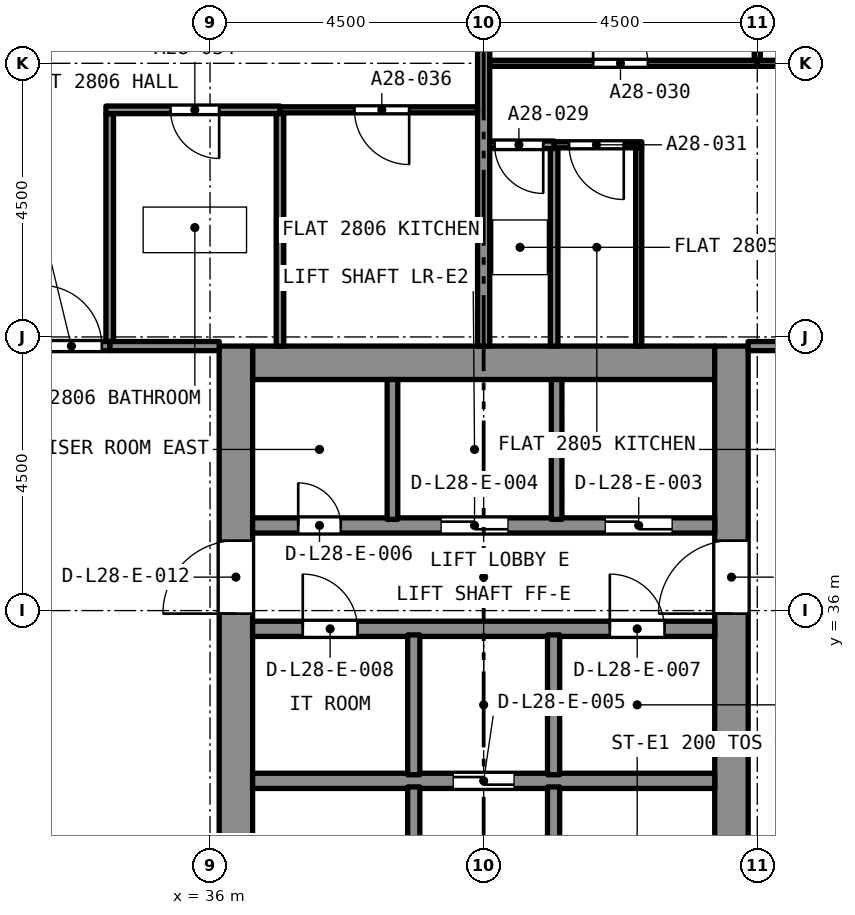
"""IFC4 building model, lengths in metres.
Left out: names, types, materials, properties, quantities, classifications, styles, units other than length and angle.
Written with IfcOpenShell. Run it as: python <this file> out.ifc"""

import sys

from ifc_helpers import new_model, si_unit, direction, frame, frame_2d, origin, place, context, subcontext, project, spatial, rectangle, extrude, element, fill, save


model = new_model("IFC4")
c1 = context("Model", 3, precision=1e-05, world=origin(), true_north=direction((0.0, 1.0)))
c2 = subcontext(c1, "Body", "Model", "MODEL_VIEW")
j1 = project(units=[si_unit("LENGTHUNIT", "METRE"), si_unit("PLANEANGLEUNIT", "RADIAN")], contexts=[c1])
p1 = place(None, origin())
s1 = spatial("IfcSite", under=j1, at=p1, CompositionType="ELEMENT")
p2 = place(p1, origin())
s2 = spatial("IfcBuilding", under=s1, at=p2, CompositionType="ELEMENT")
p3 = place(p2, frame((0.0, 0.0, 102.4)))
s3 = spatial("IfcBuildingStorey", under=s2, at=p3, CompositionType="ELEMENT", Elevation=102.4)
p4 = place(p3, frame((36.7, 40.075, 0.0), z_axis=(0.0, 0.0, 1.0), x_axis=(1.0, 0.0, 0.0)))
e1 = element("IfcWall", 1, at=p4, inside=s3, PredefinedType="SOLIDWALL", context=c2, shape_type="SweptSolid", body=[
    extrude(rectangle(XDim=7.6, YDim=0.55, at=frame_2d((3.8, 0.0))), origin(), (0.0, 0.0, 1.0), 3.2),
])
p5 = place(p3, frame((36.425, 27.15, 0.0), z_axis=(0.0, 0.0, 1.0), x_axis=(0.0, 1.0, 0.0)))
e2 = element("IfcWall", 2, at=p5, inside=s3, PredefinedType="SOLIDWALL", context=c2, shape_type="SweptSolid", body=[
    extrude(rectangle(XDim=13.2, YDim=0.55, at=frame_2d((6.6, 0.0))), origin(), (0.0, 0.0, 1.0), 3.2),
])
p6 = place(p5, frame((8.8, 0.0, 0.0)))
e3 = element("IfcOpeningElement", 3, at=p6, cuts=e2, PredefinedType="OPENING", context=c2, shape_type="SweptSolid", body=[
    extrude(rectangle(XDim=1.2, YDim=2.1, at=frame_2d((0.6, 1.05))), frame((0.0, 0.285, 0.0), z_axis=(0.0, -1.0, 0.0), x_axis=(1.0, 0.0, 0.0)), (0.0, 0.0, 1.0), 0.57),
])
p7 = place(p3, frame((44.575, 27.15, 0.0), z_axis=(0.0, 0.0, 1.0), x_axis=(0.0, 1.0, 0.0)))
e4 = element("IfcWall", 4, at=p7, inside=s3, PredefinedType="SOLIDWALL", context=c2, shape_type="SweptSolid", body=[
    extrude(rectangle(XDim=13.2, YDim=0.55, at=frame_2d((6.6, 0.0))), origin(), (0.0, 0.0, 1.0), 3.2),
])
p8 = place(p7, frame((8.8, 0.0, 0.0)))
e5 = element("IfcOpeningElement", 5, at=p8, cuts=e4, PredefinedType="OPENING", context=c2, shape_type="SweptSolid", body=[
    extrude(rectangle(XDim=1.2, YDim=2.1, at=frame_2d((0.6, 1.05))), frame((0.0, 0.285, 0.0), z_axis=(0.0, -1.0, 0.0), x_axis=(1.0, 0.0, 0.0)), (0.0, 0.0, 1.0), 0.57),
])
p9 = place(p3, frame((41.659, 43.66, 0.0), z_axis=(0.0, 0.0, 1.0), x_axis=(-1.0, 0.0, 0.0)))
e6 = element("IfcWall", 6, at=p9, inside=s3, PredefinedType="PARTITIONING", context=c2, shape_type="SweptSolid", body=[
    extrude(rectangle(XDim=1.059, YDim=0.125, at=frame_2d((0.53, 0.0))), origin(), (0.0, 0.0, 1.0), 2.9),
])
p10 = place(p9, frame((0.179, 0.0, 0.0)))
e7 = element("IfcOpeningElement", 7, at=p10, cuts=e6, PredefinedType="OPENING", context=c2, shape_type="SweptSolid", body=[
    extrude(rectangle(XDim=0.8, YDim=2.1, at=frame_2d((0.4, 1.05))), frame((0.0, 0.073, 0.0), z_axis=(0.0, -1.0, 0.0), x_axis=(1.0, 0.0, 0.0)), (0.0, 0.0, 1.0), 0.145),
])
p11 = place(p3, frame((41.659, 40.35, 0.0), z_axis=(0.0, 0.0, 1.0), x_axis=(0.0, 1.0, 0.0)))
e8 = element("IfcWall", 8, at=p11, inside=s3, PredefinedType="PARTITIONING", context=c2, shape_type="SweptSolid", body=[
    extrude(rectangle(XDim=3.247, YDim=0.125, at=frame_2d((1.624, 0.0))), origin(), (0.0, 0.0, 1.0), 2.9),
])
p12 = place(p3, frame((40.5, 40.35, 0.0), z_axis=(0.0, 0.0, 1.0), x_axis=(0.0, 1.0, 0.0)))
e9 = element("IfcWall", 9, at=p12, inside=s3, PredefinedType="PARTITIONING", context=c2, shape_type="SweptSolid", body=[
    extrude(rectangle(XDim=8.575, YDim=0.2, at=frame_2d((4.288, 0.0))), origin(), (0.0, 0.0, 1.0), 2.9),
])
p13 = place(p3, frame((40.6, 45.0, 0.0), z_axis=(0.0, 0.0, 1.0), x_axis=(1.0, 0.0, 0.0)))
e10 = element("IfcWall", 10, at=p13, inside=s3, PredefinedType="PARTITIONING", context=c2, shape_type="SweptSolid", body=[
    extrude(rectangle(XDim=4.4, YDim=0.1, at=frame_2d((2.2, 0.0))), origin(), (0.0, 0.0, 1.0), 2.9),
])
p14 = place(p13, frame((1.7, 0.0, 0.0)))
e11 = element("IfcOpeningElement", 11, at=p14, cuts=e10, PredefinedType="OPENING", context=c2, shape_type="SweptSolid", body=[
    extrude(rectangle(XDim=0.9, YDim=2.1, at=frame_2d((0.45, 1.05))), frame((0.0, 0.06, 0.0), z_axis=(0.0, -1.0, 0.0), x_axis=(1.0, 0.0, 0.0)), (0.0, 0.0, 1.0), 0.12),
])
p15 = place(p3, frame((45.0, 45.05, 0.0), z_axis=(0.0, 0.0, 1.0), x_axis=(0.0, 1.0, 0.0)))
e12 = element("IfcWall", 12, at=p15, inside=s3, PredefinedType="PARTITIONING", context=c2, shape_type="SweptSolid", body=[
    extrude(rectangle(XDim=3.828, YDim=0.1, at=frame_2d((1.914, 0.0))), origin(), (0.0, 0.0, 1.0), 2.9),
])
p16 = place(p3, frame((43.05, 40.35, 0.0), z_axis=(0.0, 0.0, 1.0), x_axis=(0.0, 1.0, 0.0)))
e13 = element("IfcWall", 13, at=p16, inside=s3, PredefinedType="PARTITIONING", context=c2, shape_type="SweptSolid", body=[
    extrude(rectangle(XDim=3.26, YDim=0.1, at=frame_2d((1.63, 0.0))), origin(), (0.0, 0.0, 1.0), 2.9),
])
p17 = place(p3, frame((43.1, 43.66, 0.0), z_axis=(0.0, 0.0, 1.0), x_axis=(-1.0, 0.0, 0.0)))
e14 = element("IfcWall", 14, at=p17, inside=s3, PredefinedType="PARTITIONING", context=c2, shape_type="SweptSolid", body=[
    extrude(rectangle(XDim=1.441, YDim=0.1, at=frame_2d((0.72, 0.0))), origin(), (0.0, 0.0, 1.0), 2.9),
])
p18 = place(p17, frame((0.295, 0.0, 0.0)))
e15 = element("IfcOpeningElement", 15, at=p18, cuts=e14, PredefinedType="OPENING", context=c2, shape_type="SweptSolid", body=[
    extrude(rectangle(XDim=0.9, YDim=2.1, at=frame_2d((0.45, 1.05))), frame((0.0, 0.06, 0.0), z_axis=(0.0, -1.0, 0.0), x_axis=(1.0, 0.0, 0.0)), (0.0, 0.0, 1.0), 0.12),
])
p19 = place(p3, frame((45.0, 45.0, 0.0), z_axis=(0.0, 0.0, 1.0), x_axis=(1.0, 0.0, 0.0)))
e16 = element("IfcWall", 16, at=p19, inside=s3, PredefinedType="PARTITIONING", context=c2, shape_type="SweptSolid", body=[
    extrude(rectangle(XDim=3.878, YDim=0.1, at=frame_2d((1.939, 0.0))), origin(), (0.0, 0.0, 1.0), 2.9),
])
p20 = place(p19, frame((1.462, 0.0, 0.0)))
e17 = element("IfcOpeningElement", 17, at=p20, cuts=e16, PredefinedType="OPENING", context=c2, shape_type="SweptSolid", body=[
    extrude(rectangle(XDim=1.0, YDim=2.1, at=frame_2d((0.5, 1.05))), frame((0.0, 0.06, 0.0), z_axis=(0.0, -1.0, 0.0), x_axis=(1.0, 0.0, 0.0)), (0.0, 0.0, 1.0), 0.12),
])
p21 = place(p3, frame((44.85, 40.35, 0.0), z_axis=(0.0, 0.0, 1.0), x_axis=(1.0, 0.0, 0.0)))
e18 = element("IfcWall", 18, at=p21, inside=s3, PredefinedType="PARTITIONING", context=c2, shape_type="SweptSolid", body=[
    extrude(rectangle(XDim=4.075, YDim=0.15, at=frame_2d((2.038, 0.0))), origin(), (0.0, 0.0, 1.0), 2.9),
])
p22 = place(p21, frame((1.9, 0.0, 0.0)))
e19 = element("IfcOpeningElement", 19, at=p22, cuts=e18, PredefinedType="OPENING", context=c2, shape_type="SweptSolid", body=[
    extrude(rectangle(XDim=1.0, YDim=2.1, at=frame_2d((0.5, 1.05))), frame((0.0, 0.085, 0.0), z_axis=(0.0, -1.0, 0.0), x_axis=(1.0, 0.0, 0.0)), (0.0, 0.0, 1.0), 0.17),
])
p23 = place(p3, frame((34.35, 40.425, 0.0), z_axis=(0.0, 0.0, 1.0), x_axis=(0.0, 1.0, 0.0)))
e20 = element("IfcWall", 20, at=p23, inside=s3, PredefinedType="PARTITIONING", context=c2, shape_type="SweptSolid", body=[
    extrude(rectangle(XDim=3.748, YDim=0.125, at=frame_2d((1.874, 0.0))), origin(), (0.0, 0.0, 1.0), 2.9),
])
p24 = place(p3, frame((37.15, 44.235, 0.0), z_axis=(0.0, 0.0, 1.0), x_axis=(-1.0, 0.0, 0.0)))
e21 = element("IfcWall", 21, at=p24, inside=s3, PredefinedType="PARTITIONING", context=c2, shape_type="SweptSolid", body=[
    extrude(rectangle(XDim=2.862, YDim=0.125, at=frame_2d((1.431, 0.0))), origin(), (0.0, 0.0, 1.0), 2.9),
])
p25 = place(p24, frame((1.0, 0.0, 0.0)))
e22 = element("IfcOpeningElement", 22, at=p25, cuts=e21, PredefinedType="OPENING", context=c2, shape_type="SweptSolid", body=[
    extrude(rectangle(XDim=0.8, YDim=2.1, at=frame_2d((0.4, 1.05))), frame((0.0, 0.073, 0.0), z_axis=(0.0, -1.0, 0.0), x_axis=(1.0, 0.0, 0.0)), (0.0, 0.0, 1.0), 0.145),
])
p26 = place(p3, frame((37.15, 40.35, 0.0), z_axis=(0.0, 0.0, 1.0), x_axis=(0.0, 1.0, 0.0)))
e23 = element("IfcWall", 23, at=p26, inside=s3, PredefinedType="PARTITIONING", context=c2, shape_type="SweptSolid", body=[
    extrude(rectangle(XDim=3.823, YDim=0.125, at=frame_2d((1.911, 0.0))), origin(), (0.0, 0.0, 1.0), 2.9),
])
p27 = place(p3, frame((34.35, 40.35, 0.0), z_axis=(0.0, 0.0, 1.0), x_axis=(1.0, 0.0, 0.0)))
e24 = element("IfcWall", 24, at=p27, inside=s3, PredefinedType="PARTITIONING", context=c2, shape_type="SweptSolid", body=[
    extrude(rectangle(XDim=1.8, YDim=0.15, at=frame_2d((0.9, 0.0))), origin(), (0.0, 0.0, 1.0), 2.9),
])
p28 = place(p3, frame((40.4, 44.235, 0.0), z_axis=(0.0, 0.0, 1.0), x_axis=(-1.0, 0.0, 0.0)))
e25 = element("IfcWall", 25, at=p28, inside=s3, PredefinedType="PARTITIONING", context=c2, shape_type="SweptSolid", body=[
    extrude(rectangle(XDim=3.25, YDim=0.1, at=frame_2d((1.625, 0.0))), origin(), (0.0, 0.0, 1.0), 2.9),
])
p29 = place(p28, frame((1.125, 0.0, 0.0)))
e26 = element("IfcOpeningElement", 26, at=p29, cuts=e25, PredefinedType="OPENING", context=c2, shape_type="SweptSolid", body=[
    extrude(rectangle(XDim=0.9, YDim=2.1, at=frame_2d((0.45, 1.05))), frame((0.0, 0.06, 0.0), z_axis=(0.0, -1.0, 0.0), x_axis=(1.0, 0.0, 0.0)), (0.0, 0.0, 1.0), 0.12),
])
p30 = place(p3, frame((32.075, 40.35, 0.0), z_axis=(0.0, 0.0, 1.0), x_axis=(1.0, 0.0, 0.0)))
e27 = element("IfcWall", 27, at=p30, inside=s3, PredefinedType="PARTITIONING", context=c2, shape_type="SweptSolid", body=[
    extrude(rectangle(XDim=2.275, YDim=0.15, at=frame_2d((1.138, 0.0))), origin(), (0.0, 0.0, 1.0), 2.9),
])
p31 = place(p30, frame((1.145, 0.0, 0.0)))
e28 = element("IfcOpeningElement", 28, at=p31, cuts=e27, PredefinedType="OPENING", context=c2, shape_type="SweptSolid", body=[
    extrude(rectangle(XDim=1.0, YDim=2.1, at=frame_2d((0.5, 1.05))), frame((0.0, 0.085, 0.0), z_axis=(0.0, -1.0, 0.0), x_axis=(1.0, 0.0, 0.0)), (0.0, 0.0, 1.0), 0.17),
])
p32 = place(p3, frame((36.7, 33.2, 0.0), z_axis=(0.0, 0.0, 1.0), x_axis=(1.0, 0.0, 0.0)))
e29 = element("IfcWall", 29, at=p32, inside=s3, PredefinedType="SOLIDWALL", context=c2, shape_type="SweptSolid", body=[
    extrude(rectangle(XDim=7.6, YDim=0.25, at=frame_2d((3.8, 0.0))), origin(), (0.0, 0.0, 1.0), 2.9),
])
p33 = place(p32, frame((3.3, 0.0, 0.0)))
e30 = element("IfcOpeningElement", 30, at=p33, cuts=e29, PredefinedType="OPENING", context=c2, shape_type="SweptSolid", body=[
    extrude(rectangle(XDim=1.0, YDim=2.1, at=frame_2d((0.5, 1.05))), frame((0.0, 0.135, 0.0), z_axis=(0.0, -1.0, 0.0), x_axis=(1.0, 0.0, 0.0)), (0.0, 0.0, 1.0), 0.27),
])
p34 = place(p3, frame((36.7, 35.7, 0.0), z_axis=(0.0, 0.0, 1.0), x_axis=(1.0, 0.0, 0.0)))
e31 = element("IfcWall", 31, at=p34, inside=s3, PredefinedType="SOLIDWALL", context=c2, shape_type="SweptSolid", body=[
    extrude(rectangle(XDim=7.6, YDim=0.25, at=frame_2d((3.8, 0.0))), origin(), (0.0, 0.0, 1.0), 2.9),
])
p35 = place(p34, frame((5.875, 0.0, 0.0)))
e32 = element("IfcOpeningElement", 32, at=p35, cuts=e31, PredefinedType="OPENING", context=c2, shape_type="SweptSolid", body=[
    extrude(rectangle(XDim=0.9, YDim=2.1, at=frame_2d((0.45, 1.05))), frame((0.0, 0.135, 0.0), z_axis=(0.0, -1.0, 0.0), x_axis=(1.0, 0.0, 0.0)), (0.0, 0.0, 1.0), 0.27),
])
p36 = place(p34, frame((0.825, 0.0, 0.0)))
e33 = element("IfcOpeningElement", 33, at=p36, cuts=e31, PredefinedType="OPENING", context=c2, shape_type="SweptSolid", body=[
    extrude(rectangle(XDim=0.9, YDim=2.1, at=frame_2d((0.45, 1.05))), frame((0.0, 0.135, 0.0), z_axis=(0.0, -1.0, 0.0), x_axis=(1.0, 0.0, 0.0)), (0.0, 0.0, 1.0), 0.27),
])
p37 = place(p3, frame((36.7, 37.4, 0.0), z_axis=(0.0, 0.0, 1.0), x_axis=(1.0, 0.0, 0.0)))
e34 = element("IfcWall", 34, at=p37, inside=s3, PredefinedType="SOLIDWALL", context=c2, shape_type="SweptSolid", body=[
    extrude(rectangle(XDim=7.6, YDim=0.25, at=frame_2d((3.8, 0.0))), origin(), (0.0, 0.0, 1.0), 2.9),
])
p38 = place(p37, frame((5.8, 0.0, 0.0)))
e35 = element("IfcOpeningElement", 35, at=p38, cuts=e34, PredefinedType="OPENING", context=c2, shape_type="SweptSolid", body=[
    extrude(rectangle(XDim=1.1, YDim=2.4, at=frame_2d((0.55, 1.2))), frame((0.0, 0.135, 0.0), z_axis=(0.0, -1.0, 0.0), x_axis=(1.0, 0.0, 0.0)), (0.0, 0.0, 1.0), 0.27),
])
p39 = place(p37, frame((3.1, 0.0, 0.0)))
e36 = element("IfcOpeningElement", 36, at=p39, cuts=e34, PredefinedType="OPENING", context=c2, shape_type="SweptSolid", body=[
    extrude(rectangle(XDim=1.1, YDim=2.4, at=frame_2d((0.55, 1.2))), frame((0.0, 0.135, 0.0), z_axis=(0.0, -1.0, 0.0), x_axis=(1.0, 0.0, 0.0)), (0.0, 0.0, 1.0), 0.27),
])
p40 = place(p37, frame((0.75, 0.0, 0.0)))
e37 = element("IfcOpeningElement", 37, at=p40, cuts=e34, PredefinedType="OPENING", context=c2, shape_type="SweptSolid", body=[
    extrude(rectangle(XDim=0.7, YDim=2.1, at=frame_2d((0.35, 1.05))), frame((0.0, 0.135, 0.0), z_axis=(0.0, -1.0, 0.0), x_axis=(1.0, 0.0, 0.0)), (0.0, 0.0, 1.0), 0.27),
])
p41 = place(p3, frame((41.65, 27.7, 0.0), z_axis=(0.0, 0.0, 1.0), x_axis=(0.0, 1.0, 0.0)))
e38 = element("IfcWall", 38, at=p41, inside=s3, PredefinedType="SOLIDWALL", context=c2, shape_type="SweptSolid", body=[
    extrude(rectangle(XDim=5.4, YDim=0.2, at=frame_2d((2.7, 0.0))), origin(), (0.0, 0.0, 1.0), 2.9),
])
p42 = place(p41, frame((0.2, 0.0, 0.0)))
e39 = element("IfcOpeningElement", 39, at=p42, cuts=e38, PredefinedType="OPENING", context=c2, shape_type="SweptSolid", body=[
    extrude(rectangle(XDim=0.9, YDim=2.1, at=frame_2d((0.45, 1.05))), frame((0.0, 0.11, 0.0), z_axis=(0.0, -1.0, 0.0), x_axis=(1.0, 0.0, 0.0)), (0.0, 0.0, 1.0), 0.22),
])
p43 = place(p3, frame((39.35, 27.7, 0.0), z_axis=(0.0, 0.0, 1.0), x_axis=(0.0, 1.0, 0.0)))
e40 = element("IfcWall", 40, at=p43, inside=s3, PredefinedType="SOLIDWALL", context=c2, shape_type="SweptSolid", body=[
    extrude(rectangle(XDim=5.4, YDim=0.2, at=frame_2d((2.7, 0.0))), origin(), (0.0, 0.0, 1.0), 2.9),
])
p44 = place(p43, frame((0.2, 0.0, 0.0)))
e41 = element("IfcOpeningElement", 41, at=p44, cuts=e40, PredefinedType="OPENING", context=c2, shape_type="SweptSolid", body=[
    extrude(rectangle(XDim=0.9, YDim=2.1, at=frame_2d((0.45, 1.05))), frame((0.0, 0.11, 0.0), z_axis=(0.0, -1.0, 0.0), x_axis=(1.0, 0.0, 0.0)), (0.0, 0.0, 1.0), 0.22),
])
for number, where, z_axis, x_axis in (
    (42, (41.65, 33.3, 0.0), (0.0, 0.0, 1.0), (0.0, 1.0, 0.0)),
    (43, (39.35, 33.3, 0.0), (0.0, 0.0, 1.0), (0.0, 1.0, 0.0)),
):
    element("IfcWall", number, at=place(p3, frame(where, z_axis=z_axis, x_axis=x_axis)), inside=s3, PredefinedType="SOLIDWALL", context=c2, shape_type="SweptSolid", body=[
        extrude(rectangle(XDim=2.3, YDim=0.2, at=frame_2d((1.15, 0.0))), origin(), (0.0, 0.0, 1.0), 2.9),
    ])
for number, where, z_axis, x_axis in (
    (44, (41.7, 37.5, 0.0), (0.0, 0.0, 1.0), (0.0, 1.0, 0.0)),
    (45, (39.0, 37.5, 0.0), (0.0, 0.0, 1.0), (0.0, 1.0, 0.0)),
):
    element("IfcWall", number, at=place(p3, frame(where, z_axis=z_axis, x_axis=x_axis)), inside=s3, PredefinedType="SOLIDWALL", context=c2, shape_type="SweptSolid", body=[
        extrude(rectangle(XDim=2.3, YDim=0.175, at=frame_2d((1.15, 0.0))), origin(), (0.0, 0.0, 1.0), 2.9),
    ])
p45 = place(p10, origin())
e46 = element("IfcDoor", 46, at=p45, inside=s3, OperationType="SINGLE_SWING_RIGHT", PredefinedType="DOOR", context=c2, shape_type="SweptSolid", body=[
    extrude(rectangle(XDim=0.8, YDim=2.1, at=frame_2d((0.4, 1.05))), frame((0.0, 0.025, 0.0), z_axis=(0.0, -1.0, 0.0), x_axis=(1.0, 0.0, 0.0)), (0.0, 0.0, 1.0), 0.05),
])
fill(e7, e46)
p46 = place(p14, origin())
e47 = element("IfcDoor", 47, at=p46, inside=s3, OperationType="SINGLE_SWING_LEFT", PredefinedType="DOOR", context=c2, shape_type="SweptSolid", body=[
    extrude(rectangle(XDim=0.9, YDim=2.1, at=frame_2d((0.45, 1.05))), frame((0.0, 0.025, 0.0), z_axis=(0.0, -1.0, 0.0), x_axis=(1.0, 0.0, 0.0)), (0.0, 0.0, 1.0), 0.05),
])
fill(e11, e47)
p47 = place(p18, origin())
e48 = element("IfcDoor", 48, at=p47, inside=s3, OperationType="SINGLE_SWING_RIGHT", PredefinedType="DOOR", context=c2, shape_type="SweptSolid", body=[
    extrude(rectangle(XDim=0.9, YDim=2.1, at=frame_2d((0.45, 1.05))), frame((0.0, 0.025, 0.0), z_axis=(0.0, -1.0, 0.0), x_axis=(1.0, 0.0, 0.0)), (0.0, 0.0, 1.0), 0.05),
])
fill(e15, e48)
p48 = place(p25, origin())
e49 = element("IfcDoor", 49, at=p48, inside=s3, OperationType="SINGLE_SWING_LEFT", PredefinedType="DOOR", context=c2, shape_type="SweptSolid", body=[
    extrude(rectangle(XDim=0.8, YDim=2.1, at=frame_2d((0.4, 1.05))), frame((0.0, 0.025, 0.0), z_axis=(0.0, -1.0, 0.0), x_axis=(1.0, 0.0, 0.0)), (0.0, 0.0, 1.0), 0.05),
])
fill(e22, e49)
p49 = place(p29, origin())
e50 = element("IfcDoor", 50, at=p49, inside=s3, OperationType="SINGLE_SWING_LEFT", PredefinedType="DOOR", context=c2, shape_type="SweptSolid", body=[
    extrude(rectangle(XDim=0.9, YDim=2.1, at=frame_2d((0.45, 1.05))), frame((0.0, 0.025, 0.0), z_axis=(0.0, -1.0, 0.0), x_axis=(1.0, 0.0, 0.0)), (0.0, 0.0, 1.0), 0.05),
])
fill(e26, e50)
p50 = place(p31, origin())
e51 = element("IfcDoor", 51, at=p50, inside=s3, OperationType="SINGLE_SWING_RIGHT", PredefinedType="DOOR", context=c2, shape_type="SweptSolid", body=[
    extrude(rectangle(XDim=1.0, YDim=2.1, at=frame_2d((0.5, 1.05))), frame((0.0, 0.025, 0.0), z_axis=(0.0, -1.0, 0.0), x_axis=(1.0, 0.0, 0.0)), (0.0, 0.0, 1.0), 0.05),
])
fill(e28, e51)
p51 = place(p38, origin())
e52 = element("IfcDoor", 52, at=p51, inside=s3, OperationType="SLIDING_TO_LEFT", PredefinedType="DOOR", context=c2, shape_type="SweptSolid", body=[
    extrude(rectangle(XDim=1.1, YDim=2.4, at=frame_2d((0.55, 1.2))), frame((0.0, 0.025, 0.0), z_axis=(0.0, -1.0, 0.0), x_axis=(1.0, 0.0, 0.0)), (0.0, 0.0, 1.0), 0.05),
])
fill(e35, e52)
p52 = place(p39, origin())
e53 = element("IfcDoor", 53, at=p52, inside=s3, OperationType="SLIDING_TO_LEFT", PredefinedType="DOOR", context=c2, shape_type="SweptSolid", body=[
    extrude(rectangle(XDim=1.1, YDim=2.4, at=frame_2d((0.55, 1.2))), frame((0.0, 0.025, 0.0), z_axis=(0.0, -1.0, 0.0), x_axis=(1.0, 0.0, 0.0)), (0.0, 0.0, 1.0), 0.05),
])
fill(e36, e53)
p53 = place(p33, origin())
e54 = element("IfcDoor", 54, at=p53, inside=s3, OperationType="SLIDING_TO_LEFT", PredefinedType="DOOR", context=c2, shape_type="SweptSolid", body=[
    extrude(rectangle(XDim=1.0, YDim=2.1, at=frame_2d((0.5, 1.05))), frame((0.0, 0.025, 0.0), z_axis=(0.0, -1.0, 0.0), x_axis=(1.0, 0.0, 0.0)), (0.0, 0.0, 1.0), 0.05),
])
fill(e30, e54)
p54 = place(p40, origin())
e55 = element("IfcDoor", 55, at=p54, inside=s3, OperationType="SINGLE_SWING_LEFT", PredefinedType="DOOR", context=c2, shape_type="SweptSolid", body=[
    extrude(rectangle(XDim=0.7, YDim=2.1, at=frame_2d((0.35, 1.05))), frame((0.0, 0.025, 0.0), z_axis=(0.0, -1.0, 0.0), x_axis=(1.0, 0.0, 0.0)), (0.0, 0.0, 1.0), 0.05),
])
fill(e37, e55)
p55 = place(p35, origin())
e56 = element("IfcDoor", 56, at=p55, inside=s3, OperationType="SINGLE_SWING_LEFT", PredefinedType="DOOR", context=c2, shape_type="SweptSolid", body=[
    extrude(rectangle(XDim=0.9, YDim=2.1, at=frame_2d((0.45, 1.05))), frame((0.0, 0.025, 0.0), z_axis=(0.0, -1.0, 0.0), x_axis=(1.0, 0.0, 0.0)), (0.0, 0.0, 1.0), 0.05),
])
fill(e32, e56)
p56 = place(p36, origin())
e57 = element("IfcDoor", 57, at=p56, inside=s3, OperationType="SINGLE_SWING_LEFT", PredefinedType="DOOR", context=c2, shape_type="SweptSolid", body=[
    extrude(rectangle(XDim=0.9, YDim=2.1, at=frame_2d((0.45, 1.05))), frame((0.0, 0.025, 0.0), z_axis=(0.0, -1.0, 0.0), x_axis=(1.0, 0.0, 0.0)), (0.0, 0.0, 1.0), 0.05),
])
fill(e33, e57)
p57 = place(p6, origin())
e58 = element("IfcDoor", 58, at=p57, inside=s3, OperationType="SINGLE_SWING_LEFT", PredefinedType="DOOR", context=c2, shape_type="SweptSolid", body=[
    extrude(rectangle(XDim=1.2, YDim=2.1, at=frame_2d((0.6, 1.05))), frame((0.0, 0.025, 0.0), z_axis=(0.0, -1.0, 0.0), x_axis=(1.0, 0.0, 0.0)), (0.0, 0.0, 1.0), 0.05),
])
fill(e3, e58)
p58 = place(p8, origin())
e59 = element("IfcDoor", 59, at=p58, inside=s3, OperationType="SINGLE_SWING_LEFT", PredefinedType="DOOR", context=c2, shape_type="SweptSolid", body=[
    extrude(rectangle(XDim=1.2, YDim=2.1, at=frame_2d((0.6, 1.05))), frame((0.0, 0.025, 0.0), z_axis=(0.0, -1.0, 0.0), x_axis=(1.0, 0.0, 0.0)), (0.0, 0.0, 1.0), 0.05),
])
fill(e5, e59)
save(model, sys.argv[1])
